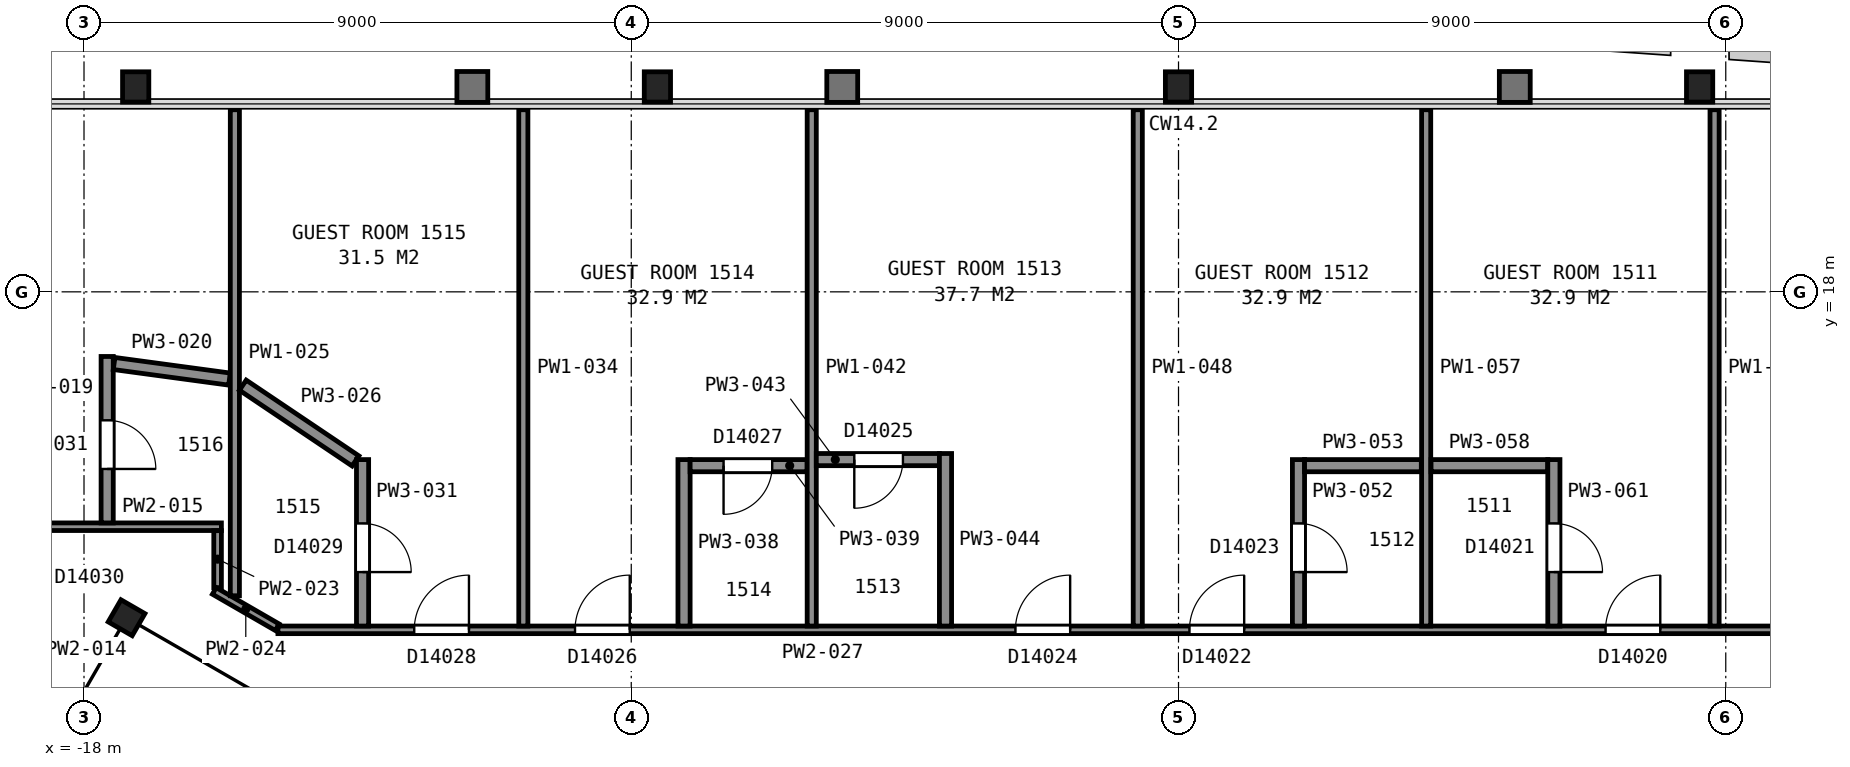
"""IFC4 building model, lengths in metres.
Left out: names, types, materials, properties, quantities, classifications, styles, units other than length and angle.
Written with IfcOpenShell. Run it as: python <this file> out.ifc"""

import sys

from ifc_helpers import new_model, si_unit, direction, frame, frame_2d, origin, origin_2d, place, context, subcontext, project, spatial, rectangle, i_section, extrude, element, fill, save


model = new_model("IFC4")
c1 = context("Model", 3, precision=1e-05, world=origin(), true_north=direction((0.0, 1.0)))
c2 = subcontext(c1, "Body", "Model", "MODEL_VIEW")
j1 = project(units=[si_unit("LENGTHUNIT", "METRE"), si_unit("PLANEANGLEUNIT", "RADIAN")], contexts=[c1])
p1 = place(None, origin())
s1 = spatial("IfcSite", under=j1, at=p1, CompositionType="ELEMENT")
p2 = place(p1, origin())
s2 = spatial("IfcBuilding", under=s1, at=p2, CompositionType="ELEMENT")
p3 = place(p2, frame((0.0, 0.0, 69.2)))
s3 = spatial("IfcBuildingStorey", under=s2, at=p3, CompositionType="ELEMENT", Elevation=69.2)
for number, where, z_axis, x_axis in (
    (1, (8.57, 21.37, 0.0), (0.0, 0.0, 1.0), (1.0, 0.0, 0.0)),
    (2, (0.0, 21.37, 0.0), (0.0, 0.0, 1.0), (1.0, 0.0, 0.0)),
    (3, (-8.57, 21.37, 0.0), (0.0, 0.0, 1.0), (1.0, 0.0, 0.0)),
    (4, (-17.15, 21.37, 0.0), (0.0, 0.0, 1.0), (1.0, 0.0, 0.0)),
):
    element("IfcColumn", number, at=place(p3, frame(where, z_axis=z_axis, x_axis=x_axis)), inside=s3, PredefinedType="COLUMN", context=c2, shape_type="SweptSolid", body=[
        extrude(i_section(OverallWidth=0.432, OverallDepth=0.498, WebThickness=0.056, FlangeThickness=0.089, FilletRadius=0.015, at=origin_2d()), origin(), (0.0, 0.0, 1.0), 3.575),
    ])
p4 = place(p3, frame((-17.3, 12.64, 0.0), z_axis=(0.0, 0.0, 1.0), x_axis=(0.5, 0.866025403784, 0.0)))
e5 = element("IfcColumn", 5, at=p4, inside=s3, PredefinedType="COLUMN", context=c2, shape_type="SweptSolid", body=[
    extrude(i_section(OverallWidth=0.419, OverallDepth=0.455, WebThickness=0.042, FlangeThickness=0.068, FilletRadius=0.015, at=origin_2d()), origin(), (0.0, 0.0, 1.0), 3.6),
])
p5 = place(p3, frame((-18.86, 14.137, 0.0), z_axis=(0.0, 0.0, 1.0), x_axis=(1.0, 0.0, 0.0)))
e6 = element("IfcWall", 6, at=p5, inside=s3, PredefinedType="PARTITIONING", context=c2, shape_type="SweptSolid", body=[
    extrude(rectangle(XDim=3.119, YDim=0.125, at=frame_2d((1.56, 0.0))), origin(), (0.0, 0.0, 1.0), 2.613),
])
p6 = place(p3, frame((-17.619, 16.937, 0.0), z_axis=(0.0, 0.0, 1.0), x_axis=(0.0, -1.0, 0.0)))
e7 = element("IfcWall", 7, at=p6, inside=s3, PredefinedType="PARTITIONING", context=c2, shape_type="SweptSolid", body=[
    extrude(rectangle(XDim=2.738, YDim=0.2, at=frame_2d((1.369, 0.0))), origin(), (0.0, 0.0, 1.0), 2.613),
])
p7 = place(p6, frame((1.05, 0.0, 0.0)))
e8 = element("IfcOpeningElement", 8, at=p7, cuts=e7, PredefinedType="OPENING", context=c2, shape_type="SweptSolid", body=[
    extrude(rectangle(XDim=0.8, YDim=2.1, at=frame_2d((0.4, 1.05))), frame((0.0, 0.11, 0.0), z_axis=(0.0, -1.0, 0.0), x_axis=(1.0, 0.0, 0.0)), (0.0, 0.0, 1.0), 0.22),
])
p8 = place(p3, frame((-17.505, 16.822, 0.0), z_axis=(0.0, 0.0, 1.0), x_axis=(0.990982367401, -0.133992341199, 0.0)))
e9 = element("IfcWall", 9, at=p8, inside=s3, PredefinedType="PARTITIONING", context=c2, shape_type="SweptSolid", body=[
    extrude(rectangle(XDim=1.915, YDim=0.2, at=frame_2d((0.958, 0.0))), origin(), (0.0, 0.0, 1.0), 2.613),
])
p9 = place(p3, frame((-15.803, 13.135, 0.0), z_axis=(0.0, 0.0, 1.0), x_axis=(0.0, 1.0, 0.0)))
e10 = element("IfcWall", 10, at=p9, inside=s3, PredefinedType="PARTITIONING", context=c2, shape_type="SweptSolid", body=[
    extrude(rectangle(XDim=0.937, YDim=0.125, at=frame_2d((0.469, 0.0))), origin(), (0.0, 0.0, 1.0), 2.613),
])
p10 = place(p3, frame((-15.857, 13.081, 0.0), z_axis=(0.0, 0.0, 1.0), x_axis=(0.866035997947, -0.499981649923, 0.0)))
e11 = element("IfcWall", 11, at=p10, inside=s3, PredefinedType="PARTITIONING", context=c2, shape_type="SweptSolid", body=[
    extrude(rectangle(XDim=1.196, YDim=0.125, at=frame_2d((0.598, 0.0))), origin(), (0.0, 0.0, 1.0), 2.613),
])
p11 = place(p3, frame((-15.519, 13.001, 0.0), z_axis=(0.0, 0.0, 1.0), x_axis=(0.0, 1.0, 0.0)))
e12 = element("IfcWall", 12, at=p11, inside=s3, PredefinedType="PARTITIONING", context=c2, shape_type="SweptSolid", body=[
    extrude(rectangle(XDim=7.994, YDim=0.15, at=frame_2d((3.997, 0.0))), origin(), (0.0, 0.0, 1.0), 2.613),
])
p12 = place(p3, frame((-15.388, 16.465, 0.0), z_axis=(0.0, 0.0, 1.0), x_axis=(0.82987399284, -0.557950854474, 0.0)))
e13 = element("IfcWall", 13, at=p12, inside=s3, PredefinedType="PARTITIONING", context=c2, shape_type="SweptSolid", body=[
    extrude(rectangle(XDim=2.233, YDim=0.2, at=frame_2d((1.116, 0.0))), origin(), (0.0, 0.0, 1.0), 2.613),
])
p13 = place(p3, frame((-14.811, 12.441, 0.0), z_axis=(0.0, 0.0, 1.0), x_axis=(1.0, 0.0, 0.0)))
e14 = element("IfcWall", 14, at=p13, inside=s3, PredefinedType="PARTITIONING", context=c2, shape_type="SweptSolid", body=[
    extrude(rectangle(XDim=29.621, YDim=0.125, at=frame_2d((14.811, 0.0))), origin(), (0.0, 0.0, 1.0), 2.613),
])
p14 = place(p13, frame((25.326, 0.0, 0.0)))
e15 = element("IfcOpeningElement", 15, at=p14, cuts=e14, PredefinedType="OPENING", context=c2, shape_type="SweptSolid", body=[
    extrude(rectangle(XDim=0.9, YDim=2.1, at=frame_2d((0.45, 1.05))), frame((0.0, 0.073, 0.0), z_axis=(0.0, -1.0, 0.0), x_axis=(1.0, 0.0, 0.0)), (0.0, 0.0, 1.0), 0.145),
])
p15 = place(p13, frame((21.833, 0.0, 0.0)))
e16 = element("IfcOpeningElement", 16, at=p15, cuts=e14, PredefinedType="OPENING", context=c2, shape_type="SweptSolid", body=[
    extrude(rectangle(XDim=0.9, YDim=2.1, at=frame_2d((0.45, 1.05))), frame((0.0, 0.073, 0.0), z_axis=(0.0, -1.0, 0.0), x_axis=(1.0, 0.0, 0.0)), (0.0, 0.0, 1.0), 0.145),
])
p16 = place(p13, frame((14.99, 0.0, 0.0)))
e17 = element("IfcOpeningElement", 17, at=p16, cuts=e14, PredefinedType="OPENING", context=c2, shape_type="SweptSolid", body=[
    extrude(rectangle(XDim=0.9, YDim=2.1, at=frame_2d((0.45, 1.05))), frame((0.0, 0.073, 0.0), z_axis=(0.0, -1.0, 0.0), x_axis=(1.0, 0.0, 0.0)), (0.0, 0.0, 1.0), 0.145),
])
p17 = place(p13, frame((12.128, 0.0, 0.0)))
e18 = element("IfcOpeningElement", 18, at=p17, cuts=e14, PredefinedType="OPENING", context=c2, shape_type="SweptSolid", body=[
    extrude(rectangle(XDim=0.9, YDim=2.1, at=frame_2d((0.45, 1.05))), frame((0.0, 0.073, 0.0), z_axis=(0.0, -1.0, 0.0), x_axis=(1.0, 0.0, 0.0)), (0.0, 0.0, 1.0), 0.145),
])
p18 = place(p13, frame((4.885, 0.0, 0.0)))
e19 = element("IfcOpeningElement", 19, at=p18, cuts=e14, PredefinedType="OPENING", context=c2, shape_type="SweptSolid", body=[
    extrude(rectangle(XDim=0.9, YDim=2.1, at=frame_2d((0.45, 1.05))), frame((0.0, 0.073, 0.0), z_axis=(0.0, -1.0, 0.0), x_axis=(1.0, 0.0, 0.0)), (0.0, 0.0, 1.0), 0.145),
])
p19 = place(p13, frame((2.241, 0.0, 0.0)))
e20 = element("IfcOpeningElement", 20, at=p19, cuts=e14, PredefinedType="OPENING", context=c2, shape_type="SweptSolid", body=[
    extrude(rectangle(XDim=0.9, YDim=2.1, at=frame_2d((0.45, 1.05))), frame((0.0, 0.073, 0.0), z_axis=(0.0, -1.0, 0.0), x_axis=(1.0, 0.0, 0.0)), (0.0, 0.0, 1.0), 0.145),
])
p20 = place(p3, frame((-13.419, 12.503, 0.0), z_axis=(0.0, 0.0, 1.0), x_axis=(0.0, 1.0, 0.0)))
e21 = element("IfcWall", 21, at=p20, inside=s3, PredefinedType="PARTITIONING", context=c2, shape_type="SweptSolid", body=[
    extrude(rectangle(XDim=2.738, YDim=0.2, at=frame_2d((1.369, 0.0))), origin(), (0.0, 0.0, 1.0), 2.613),
])
p21 = place(p20, frame((0.887, 0.0, 0.0)))
e22 = element("IfcOpeningElement", 22, at=p21, cuts=e21, PredefinedType="OPENING", context=c2, shape_type="SweptSolid", body=[
    extrude(rectangle(XDim=0.8, YDim=2.1, at=frame_2d((0.4, 1.05))), frame((0.0, 0.11, 0.0), z_axis=(0.0, -1.0, 0.0), x_axis=(1.0, 0.0, 0.0)), (0.0, 0.0, 1.0), 0.22),
])
p22 = place(p3, frame((-10.775, 12.503, 0.0), z_axis=(0.0, 0.0, 1.0), x_axis=(0.0, 1.0, 0.0)))
e23 = element("IfcWall", 23, at=p22, inside=s3, PredefinedType="PARTITIONING", context=c2, shape_type="SweptSolid", body=[
    extrude(rectangle(XDim=8.492, YDim=0.15, at=frame_2d((4.246, 0.0))), origin(), (0.0, 0.0, 1.0), 2.613),
])
p23 = place(p3, frame((-8.132, 12.503, 0.0), z_axis=(0.0, 0.0, 1.0), x_axis=(0.0, 1.0, 0.0)))
e24 = element("IfcWall", 24, at=p23, inside=s3, PredefinedType="PARTITIONING", context=c2, shape_type="SweptSolid", body=[
    extrude(rectangle(XDim=2.738, YDim=0.2, at=frame_2d((1.369, 0.0))), origin(), (0.0, 0.0, 1.0), 2.613),
])
p24 = place(p3, frame((-6.107, 15.141, 0.0), z_axis=(0.0, 0.0, 1.0), x_axis=(-1.0, 0.0, 0.0)))
e25 = element("IfcWall", 25, at=p24, inside=s3, PredefinedType="PARTITIONING", context=c2, shape_type="SweptSolid", body=[
    extrude(rectangle(XDim=1.925, YDim=0.2, at=frame_2d((0.962, 0.0))), origin(), (0.0, 0.0, 1.0), 2.613),
])
p25 = place(p24, frame((0.575, 0.0, 0.0)))
e26 = element("IfcOpeningElement", 26, at=p25, cuts=e25, PredefinedType="OPENING", context=c2, shape_type="SweptSolid", body=[
    extrude(rectangle(XDim=0.8, YDim=2.1, at=frame_2d((0.4, 1.05))), frame((0.0, 0.11, 0.0), z_axis=(0.0, -1.0, 0.0), x_axis=(1.0, 0.0, 0.0)), (0.0, 0.0, 1.0), 0.22),
])
p26 = place(p3, frame((-6.032, 12.503, 0.0), z_axis=(0.0, 0.0, 1.0), x_axis=(0.0, 1.0, 0.0)))
e27 = element("IfcWall", 27, at=p26, inside=s3, PredefinedType="PARTITIONING", context=c2, shape_type="SweptSolid", body=[
    extrude(rectangle(XDim=8.492, YDim=0.15, at=frame_2d((4.246, 0.0))), origin(), (0.0, 0.0, 1.0), 2.613),
])
p27 = place(p3, frame((-3.932, 15.241, 0.0), z_axis=(0.0, 0.0, 1.0), x_axis=(-1.0, 0.0, 0.0)))
e28 = element("IfcWall", 28, at=p27, inside=s3, PredefinedType="PARTITIONING", context=c2, shape_type="SweptSolid", body=[
    extrude(rectangle(XDim=2.025, YDim=0.2, at=frame_2d((1.013, 0.0))), origin(), (0.0, 0.0, 1.0), 2.613),
])
p28 = place(p27, frame((0.6, 0.0, 0.0)))
e29 = element("IfcOpeningElement", 29, at=p28, cuts=e28, PredefinedType="OPENING", context=c2, shape_type="SweptSolid", body=[
    extrude(rectangle(XDim=0.8, YDim=2.1, at=frame_2d((0.4, 1.05))), frame((0.0, 0.11, 0.0), z_axis=(0.0, -1.0, 0.0), x_axis=(1.0, 0.0, 0.0)), (0.0, 0.0, 1.0), 0.22),
])
p29 = place(p3, frame((-3.832, 12.503, 0.0), z_axis=(0.0, 0.0, 1.0), x_axis=(0.0, 1.0, 0.0)))
e30 = element("IfcWall", 30, at=p29, inside=s3, PredefinedType="PARTITIONING", context=c2, shape_type="SweptSolid", body=[
    extrude(rectangle(XDim=2.838, YDim=0.2, at=frame_2d((1.419, 0.0))), origin(), (0.0, 0.0, 1.0), 2.613),
])
p30 = place(p3, frame((-0.67, 12.503, 0.0), z_axis=(0.0, 0.0, 1.0), x_axis=(0.0, 1.0, 0.0)))
e31 = element("IfcWall", 31, at=p30, inside=s3, PredefinedType="PARTITIONING", context=c2, shape_type="SweptSolid", body=[
    extrude(rectangle(XDim=8.492, YDim=0.15, at=frame_2d((4.246, 0.0))), origin(), (0.0, 0.0, 1.0), 2.613),
])
p31 = place(p3, frame((1.973, 15.241, 0.0), z_axis=(0.0, 0.0, 1.0), x_axis=(0.0, -1.0, 0.0)))
e32 = element("IfcWall", 32, at=p31, inside=s3, PredefinedType="PARTITIONING", context=c2, shape_type="SweptSolid", body=[
    extrude(rectangle(XDim=2.738, YDim=0.2, at=frame_2d((1.369, 0.0))), origin(), (0.0, 0.0, 1.0), 2.613),
])
p32 = place(p31, frame((1.05, 0.0, 0.0)))
e33 = element("IfcOpeningElement", 33, at=p32, cuts=e32, PredefinedType="OPENING", context=c2, shape_type="SweptSolid", body=[
    extrude(rectangle(XDim=0.8, YDim=2.1, at=frame_2d((0.4, 1.05))), frame((0.0, 0.11, 0.0), z_axis=(0.0, -1.0, 0.0), x_axis=(1.0, 0.0, 0.0)), (0.0, 0.0, 1.0), 0.22),
])
p33 = place(p3, frame((2.073, 15.141, 0.0), z_axis=(0.0, 0.0, 1.0), x_axis=(1.0, 0.0, 0.0)))
e34 = element("IfcWall", 34, at=p33, inside=s3, PredefinedType="PARTITIONING", context=c2, shape_type="SweptSolid", body=[
    extrude(rectangle(XDim=1.92, YDim=0.2, at=frame_2d((0.96, 0.0))), origin(), (0.0, 0.0, 1.0), 2.613),
])
p34 = place(p3, frame((4.073, 12.503, 0.0), z_axis=(0.0, 0.0, 1.0), x_axis=(0.0, 1.0, 0.0)))
e35 = element("IfcWall", 35, at=p34, inside=s3, PredefinedType="PARTITIONING", context=c2, shape_type="SweptSolid", body=[
    extrude(rectangle(XDim=8.492, YDim=0.15, at=frame_2d((4.246, 0.0))), origin(), (0.0, 0.0, 1.0), 2.613),
])
p35 = place(p3, frame((4.153, 15.141, 0.0), z_axis=(0.0, 0.0, 1.0), x_axis=(1.0, 0.0, 0.0)))
e36 = element("IfcWall", 36, at=p35, inside=s3, PredefinedType="PARTITIONING", context=c2, shape_type="SweptSolid", body=[
    extrude(rectangle(XDim=1.92, YDim=0.2, at=frame_2d((0.96, 0.0))), origin(), (0.0, 0.0, 1.0), 2.613),
])
p36 = place(p3, frame((6.173, 12.503, 0.0), z_axis=(0.0, 0.0, 1.0), x_axis=(0.0, 1.0, 0.0)))
e37 = element("IfcWall", 37, at=p36, inside=s3, PredefinedType="PARTITIONING", context=c2, shape_type="SweptSolid", body=[
    extrude(rectangle(XDim=2.738, YDim=0.2, at=frame_2d((1.369, 0.0))), origin(), (0.0, 0.0, 1.0), 2.613),
])
p37 = place(p36, frame((0.887, 0.0, 0.0)))
e38 = element("IfcOpeningElement", 38, at=p37, cuts=e37, PredefinedType="OPENING", context=c2, shape_type="SweptSolid", body=[
    extrude(rectangle(XDim=0.8, YDim=2.1, at=frame_2d((0.4, 1.05))), frame((0.0, 0.11, 0.0), z_axis=(0.0, -1.0, 0.0), x_axis=(1.0, 0.0, 0.0)), (0.0, 0.0, 1.0), 0.22),
])
p38 = place(p3, frame((8.816, 12.503, 0.0), z_axis=(0.0, 0.0, 1.0), x_axis=(0.0, 1.0, 0.0)))
e39 = element("IfcWall", 39, at=p38, inside=s3, PredefinedType="PARTITIONING", context=c2, shape_type="SweptSolid", body=[
    extrude(rectangle(XDim=8.492, YDim=0.15, at=frame_2d((4.246, 0.0))), origin(), (0.0, 0.0, 1.0), 2.613),
])
p39 = place(p7, origin())
e40 = element("IfcDoor", 40, at=p39, inside=s3, OperationType="SINGLE_SWING_RIGHT", PredefinedType="DOOR", context=c2, shape_type="SweptSolid", body=[
    extrude(rectangle(XDim=0.8, YDim=2.1, at=frame_2d((0.4, 1.05))), frame((0.0, 0.025, 0.0), z_axis=(0.0, -1.0, 0.0), x_axis=(1.0, 0.0, 0.0)), (0.0, 0.0, 1.0), 0.05),
])
fill(e8, e40)
p40 = place(p15, origin())
e41 = element("IfcDoor", 41, at=p40, inside=s3, OperationType="SINGLE_SWING_RIGHT", PredefinedType="DOOR", context=c2, shape_type="SweptSolid", body=[
    extrude(rectangle(XDim=0.9, YDim=2.1, at=frame_2d((0.45, 1.05))), frame((0.0, 0.025, 0.0), z_axis=(0.0, -1.0, 0.0), x_axis=(1.0, 0.0, 0.0)), (0.0, 0.0, 1.0), 0.05),
])
fill(e16, e41)
p41 = place(p16, origin())
e42 = element("IfcDoor", 42, at=p41, inside=s3, OperationType="SINGLE_SWING_RIGHT", PredefinedType="DOOR", context=c2, shape_type="SweptSolid", body=[
    extrude(rectangle(XDim=0.9, YDim=2.1, at=frame_2d((0.45, 1.05))), frame((0.0, 0.025, 0.0), z_axis=(0.0, -1.0, 0.0), x_axis=(1.0, 0.0, 0.0)), (0.0, 0.0, 1.0), 0.05),
])
fill(e17, e42)
p42 = place(p17, origin())
e43 = element("IfcDoor", 43, at=p42, inside=s3, OperationType="SINGLE_SWING_RIGHT", PredefinedType="DOOR", context=c2, shape_type="SweptSolid", body=[
    extrude(rectangle(XDim=0.9, YDim=2.1, at=frame_2d((0.45, 1.05))), frame((0.0, 0.025, 0.0), z_axis=(0.0, -1.0, 0.0), x_axis=(1.0, 0.0, 0.0)), (0.0, 0.0, 1.0), 0.05),
])
fill(e18, e43)
p43 = place(p18, origin())
e44 = element("IfcDoor", 44, at=p43, inside=s3, OperationType="SINGLE_SWING_RIGHT", PredefinedType="DOOR", context=c2, shape_type="SweptSolid", body=[
    extrude(rectangle(XDim=0.9, YDim=2.1, at=frame_2d((0.45, 1.05))), frame((0.0, 0.025, 0.0), z_axis=(0.0, -1.0, 0.0), x_axis=(1.0, 0.0, 0.0)), (0.0, 0.0, 1.0), 0.05),
])
fill(e19, e44)
p44 = place(p19, origin())
e45 = element("IfcDoor", 45, at=p44, inside=s3, OperationType="SINGLE_SWING_RIGHT", PredefinedType="DOOR", context=c2, shape_type="SweptSolid", body=[
    extrude(rectangle(XDim=0.9, YDim=2.1, at=frame_2d((0.45, 1.05))), frame((0.0, 0.025, 0.0), z_axis=(0.0, -1.0, 0.0), x_axis=(1.0, 0.0, 0.0)), (0.0, 0.0, 1.0), 0.05),
])
fill(e20, e45)
p45 = place(p21, origin())
e46 = element("IfcDoor", 46, at=p45, inside=s3, OperationType="SINGLE_SWING_LEFT", PredefinedType="DOOR", context=c2, shape_type="SweptSolid", body=[
    extrude(rectangle(XDim=0.8, YDim=2.1, at=frame_2d((0.4, 1.05))), frame((0.0, 0.025, 0.0), z_axis=(0.0, -1.0, 0.0), x_axis=(1.0, 0.0, 0.0)), (0.0, 0.0, 1.0), 0.05),
])
fill(e22, e46)
p46 = place(p25, origin())
e47 = element("IfcDoor", 47, at=p46, inside=s3, OperationType="SINGLE_SWING_RIGHT", PredefinedType="DOOR", context=c2, shape_type="SweptSolid", body=[
    extrude(rectangle(XDim=0.8, YDim=2.1, at=frame_2d((0.4, 1.05))), frame((0.0, 0.025, 0.0), z_axis=(0.0, -1.0, 0.0), x_axis=(1.0, 0.0, 0.0)), (0.0, 0.0, 1.0), 0.05),
])
fill(e26, e47)
p47 = place(p28, origin())
e48 = element("IfcDoor", 48, at=p47, inside=s3, OperationType="SINGLE_SWING_RIGHT", PredefinedType="DOOR", context=c2, shape_type="SweptSolid", body=[
    extrude(rectangle(XDim=0.8, YDim=2.1, at=frame_2d((0.4, 1.05))), frame((0.0, 0.025, 0.0), z_axis=(0.0, -1.0, 0.0), x_axis=(1.0, 0.0, 0.0)), (0.0, 0.0, 1.0), 0.05),
])
fill(e29, e48)
p48 = place(p32, origin())
e49 = element("IfcDoor", 49, at=p48, inside=s3, OperationType="SINGLE_SWING_RIGHT", PredefinedType="DOOR", context=c2, shape_type="SweptSolid", body=[
    extrude(rectangle(XDim=0.8, YDim=2.1, at=frame_2d((0.4, 1.05))), frame((0.0, 0.025, 0.0), z_axis=(0.0, -1.0, 0.0), x_axis=(1.0, 0.0, 0.0)), (0.0, 0.0, 1.0), 0.05),
])
fill(e33, e49)
p49 = place(p37, origin())
e50 = element("IfcDoor", 50, at=p49, inside=s3, OperationType="SINGLE_SWING_LEFT", PredefinedType="DOOR", context=c2, shape_type="SweptSolid", body=[
    extrude(rectangle(XDim=0.8, YDim=2.1, at=frame_2d((0.4, 1.05))), frame((0.0, 0.025, 0.0), z_axis=(0.0, -1.0, 0.0), x_axis=(1.0, 0.0, 0.0)), (0.0, 0.0, 1.0), 0.05),
])
fill(e38, e50)
save(model, sys.argv[1])
